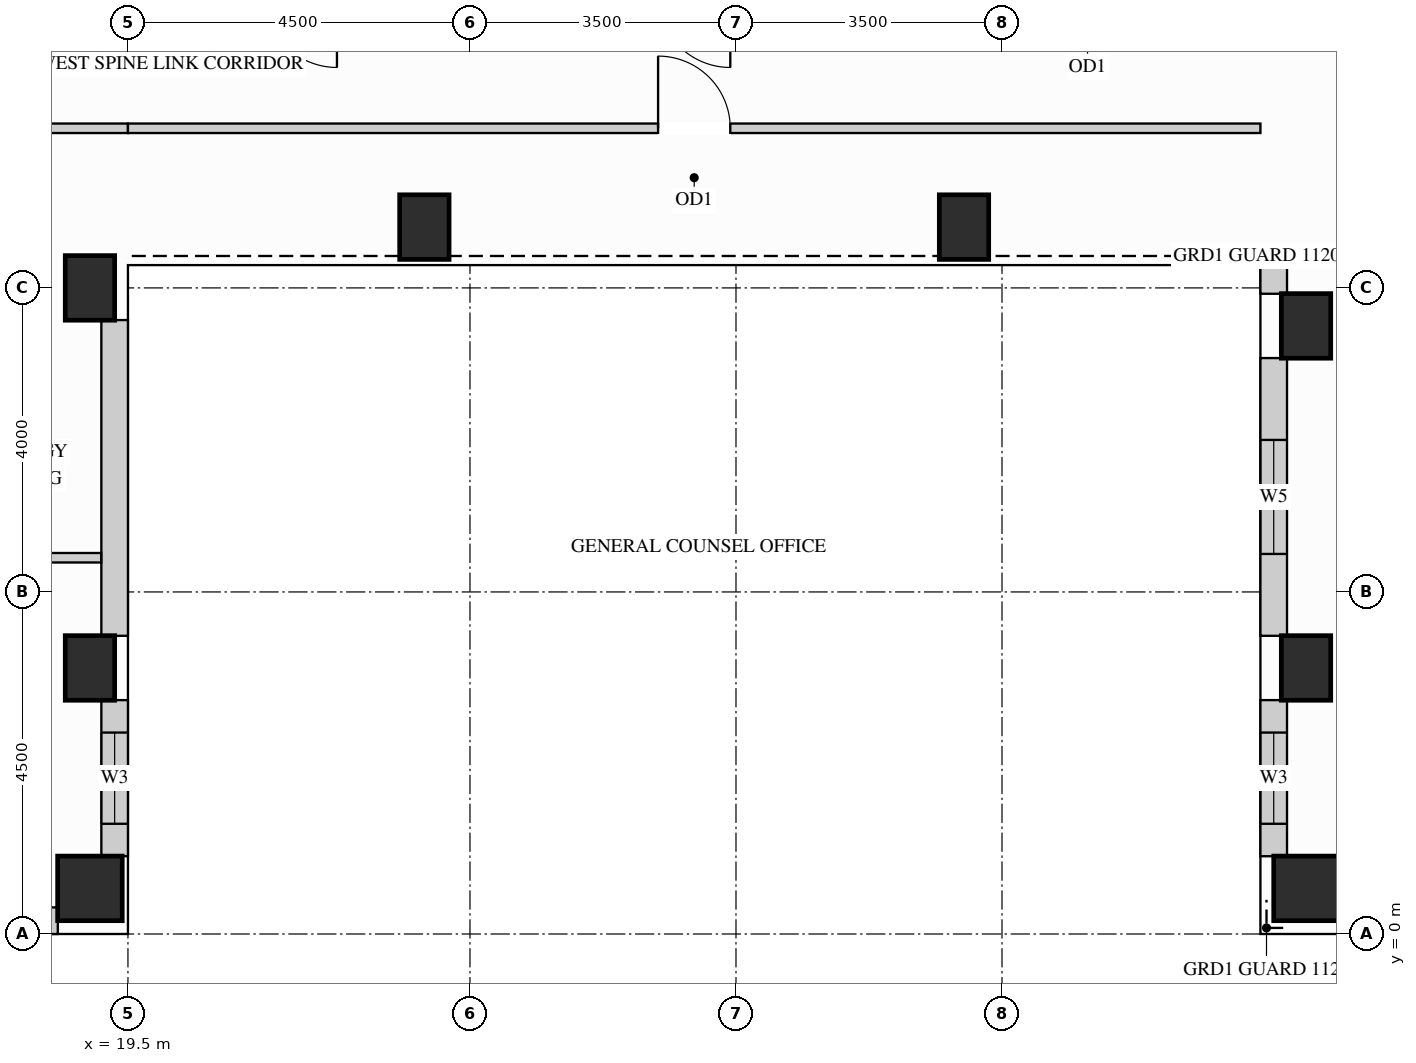
"""IFC4 building model, lengths in metres.
Left out: names, types, materials, properties, quantities, classifications, styles, units other than length and angle.
Written with IfcOpenShell. Run it as: python <this file> out.ifc"""

import sys

from ifc_helpers import new_model, si_unit, direction, frame, frame_2d, origin, origin_2d, place, context, subcontext, project, spatial, rectangle, extrude, source, transform, mapped, element, fill, save


model = new_model("IFC4")
c1 = context("Model", 3, precision=1e-05, world=origin(), true_north=direction((0.0, 1.0)))
c2 = subcontext(c1, "Body", "Model", "MODEL_VIEW")
j1 = project(units=[si_unit("LENGTHUNIT", "METRE"), si_unit("PLANEANGLEUNIT", "RADIAN")], contexts=[c1])
p1 = place(None, origin())
s1 = spatial("IfcSite", under=j1, at=p1, CompositionType="ELEMENT")
p2 = place(p1, origin())
s2 = spatial("IfcBuilding", under=s1, at=p2, CompositionType="ELEMENT")
p3 = place(p2, frame((0.0, 0.0, 244.8)))
s3 = spatial("IfcBuildingStorey", under=s2, at=p3, CompositionType="ELEMENT", Elevation=244.8)
m1 = source(origin(), c2, "Body", "SweptSolid", [
    extrude(rectangle(XDim=0.65, YDim=0.85, at=origin_2d()), origin(), (0.0, 0.0, 1.0), 3.4),
])
for number, where, z_axis, x_axis in (
    (1, (19.0, 3.5, 0.0), (0.0, 0.0, 1.0), (1.0, 0.0, 0.0)),
    (2, (19.0, 8.5, 0.0), (0.0, 0.0, 1.0), (1.0, 0.0, 0.0)),
    (3, (35.0, 3.5, 0.0), (0.0, 0.0, 1.0), (1.0, 0.0, 0.0)),
    (4, (35.0, 8.0, 0.0), (0.0, 0.0, 1.0), (1.0, 0.0, 0.0)),
    (5, (23.4, 9.3, 0.0), (0.0, 0.0, 1.0), (1.0, 0.0, 0.0)),
    (6, (30.5, 9.3, 0.0), (0.0, 0.0, 1.0), (1.0, 0.0, 0.0)),
):
    element("IfcColumn", number, at=place(p3, frame(where, z_axis=z_axis, x_axis=x_axis)), inside=s3, PredefinedType="COLUMN", context=c2, shape_type="MappedRepresentation", body=[
        mapped(m1, transform((0.0, 0.0, 0.0), x_axis=(1.0, 0.0, 0.0), y_axis=(0.0, 1.0, 0.0), z_axis=(0.0, 0.0, 1.0))),
    ])
m2 = source(origin(), c2, "Body", "SweptSolid", [
    extrude(rectangle(XDim=0.85, YDim=0.85, at=origin_2d()), origin(), (0.0, 0.0, 1.0), 3.4),
])
for number, where, z_axis, x_axis in (
    (7, (19.0, 0.6, 0.0), (0.0, 0.0, 1.0), (1.0, 0.0, 0.0)),
    (8, (35.0, 0.6, 0.0), (0.0, 0.0, 1.0), (1.0, 0.0, 0.0)),
):
    element("IfcColumn", number, at=place(p3, frame(where, z_axis=z_axis, x_axis=x_axis)), inside=s3, PredefinedType="COLUMN", context=c2, shape_type="MappedRepresentation", body=[
        mapped(m2, transform((0.0, 0.0, 0.0), x_axis=(1.0, 0.0, 0.0), y_axis=(0.0, 1.0, 0.0), z_axis=(0.0, 0.0, 1.0))),
    ])
p4 = place(p3, frame((14.923, 0.175, 0.0), z_axis=(0.0, 0.0, 1.0), x_axis=(1.0, 0.0, 0.0)))
e9 = element("IfcWall", 9, at=p4, inside=s3, PredefinedType="SOLIDWALL", context=c2, shape_type="SweptSolid", body=[
    extrude(rectangle(XDim=3.654, YDim=0.35, at=frame_2d((1.827, 0.0))), origin(), (0.0, 0.0, 1.0), 3.385),
])
p5 = place(p4, frame((0.777, 0.0, 0.78)))
e10 = element("IfcOpeningElement", 10, at=p5, cuts=e9, PredefinedType="OPENING", context=c2, shape_type="SweptSolid", body=[
    extrude(rectangle(XDim=2.1, YDim=2.25, at=frame_2d((1.05, 1.125))), frame((0.0, 0.185, 0.0), z_axis=(0.0, -1.0, 0.0), x_axis=(1.0, 0.0, 0.0)), (0.0, 0.0, 1.0), 0.37),
])
p6 = place(p3, frame((19.325, 1.023, 0.0), z_axis=(0.0, 0.0, 1.0), x_axis=(0.0, 1.0, 0.0)))
e11 = element("IfcWall", 11, at=p6, inside=s3, PredefinedType="SOLIDWALL", context=c2, shape_type="SweptSolid", body=[
    extrude(rectangle(XDim=2.054, YDim=0.35, at=frame_2d((1.027, 0.0))), origin(), (0.0, 0.0, 1.0), 2.619),
])
p7 = place(p6, frame((0.427, 0.0, 0.78)))
e12 = element("IfcOpeningElement", 12, at=p7, cuts=e11, PredefinedType="OPENING", context=c2, shape_type="SweptSolid", body=[
    extrude(rectangle(XDim=1.2, YDim=1.659, at=frame_2d((0.6, 0.83))), frame((0.0, 0.185, 0.0), z_axis=(0.0, -1.0, 0.0), x_axis=(1.0, 0.0, 0.0)), (0.0, 0.0, 1.0), 0.37),
])
m3 = source(origin(), c2, "Body", "SweptSolid", [
    extrude(rectangle(XDim=4.154, YDim=0.35, at=frame_2d((2.077, 0.0))), origin(), (0.0, 0.0, 1.0), 2.619),
])
p8 = place(p3, frame((19.325, 3.923, 0.0), z_axis=(0.0, 0.0, 1.0), x_axis=(0.0, 1.0, 0.0)))
e13 = element("IfcWall", 13, at=p8, inside=s3, PredefinedType="SOLIDWALL", context=c2, shape_type="MappedRepresentation", body=[
    mapped(m3, transform((0.0, 0.0, 0.0), x_axis=(1.0, 0.0, 0.0), y_axis=(0.0, 1.0, 0.0), z_axis=(0.0, 0.0, 1.0))),
])
m4 = source(origin(), c2, "Body", "SweptSolid", [
    extrude(rectangle(XDim=0.379, YDim=0.35, at=frame_2d((0.189, 0.0))), origin(), (0.0, 0.0, 1.0), 3.385),
])
p9 = place(p3, frame((34.575, 8.802, 0.0), z_axis=(0.0, 0.0, 1.0), x_axis=(0.0, -1.0, 0.0)))
e14 = element("IfcWall", 14, at=p9, inside=s3, PredefinedType="SOLIDWALL", context=c2, shape_type="MappedRepresentation", body=[
    mapped(m4, transform((0.0, 0.0, 0.0), x_axis=(1.0, 0.0, 0.0), y_axis=(0.0, 1.0, 0.0), z_axis=(0.0, 0.0, 1.0))),
])
p10 = place(p3, frame((34.575, 7.577, 0.0), z_axis=(0.0, 0.0, 1.0), x_axis=(0.0, -1.0, 0.0)))
e15 = element("IfcWall", 15, at=p10, inside=s3, PredefinedType="SOLIDWALL", context=c2, shape_type="SweptSolid", body=[
    extrude(rectangle(XDim=3.654, YDim=0.35, at=frame_2d((1.827, 0.0))), origin(), (0.0, 0.0, 1.0), 3.385),
])
p11 = place(p10, frame((1.077, 0.0, 0.78)))
e16 = element("IfcOpeningElement", 16, at=p11, cuts=e15, PredefinedType="OPENING", context=c2, shape_type="SweptSolid", body=[
    extrude(rectangle(XDim=1.5, YDim=2.0, at=frame_2d((0.75, 1.0))), frame((0.0, 0.185, 0.0), z_axis=(0.0, -1.0, 0.0), x_axis=(1.0, 0.0, 0.0)), (0.0, 0.0, 1.0), 0.37),
])
p12 = place(p3, frame((34.575, 3.077, 0.0), z_axis=(0.0, 0.0, 1.0), x_axis=(0.0, -1.0, 0.0)))
e17 = element("IfcWall", 17, at=p12, inside=s3, PredefinedType="SOLIDWALL", context=c2, shape_type="SweptSolid", body=[
    extrude(rectangle(XDim=2.054, YDim=0.35, at=frame_2d((1.027, 0.0))), origin(), (0.0, 0.0, 1.0), 3.385),
])
p13 = place(p12, frame((0.427, 0.0, 0.78)))
e18 = element("IfcOpeningElement", 18, at=p13, cuts=e17, PredefinedType="OPENING", context=c2, shape_type="SweptSolid", body=[
    extrude(rectangle(XDim=1.2, YDim=2.0, at=frame_2d((0.6, 1.0))), frame((0.0, 0.185, 0.0), z_axis=(0.0, -1.0, 0.0), x_axis=(1.0, 0.0, 0.0)), (0.0, 0.0, 1.0), 0.37),
])
m5 = source(origin(), c2, "Body", "SweptSolid", [
    extrude(rectangle(XDim=2.45, YDim=0.125, at=frame_2d((1.225, 0.0))), origin(), (0.0, 0.0, 1.0), 3.385),
])
p14 = place(p3, frame((17.05, 10.6, 0.0), z_axis=(0.0, 0.0, 1.0), x_axis=(1.0, 0.0, 0.0)))
e19 = element("IfcWall", 19, at=p14, inside=s3, PredefinedType="PARTITIONING", context=c2, shape_type="MappedRepresentation", body=[
    mapped(m5, transform((0.0, 0.0, 0.0), x_axis=(1.0, 0.0, 0.0), y_axis=(0.0, 1.0, 0.0), z_axis=(0.0, 0.0, 1.0))),
])
p15 = place(p3, frame((19.5, 10.6, 0.0), z_axis=(0.0, 0.0, 1.0), x_axis=(1.0, 0.0, 0.0)))
e20 = element("IfcWall", 20, at=p15, inside=s3, PredefinedType="PARTITIONING", context=c2, shape_type="SweptSolid", body=[
    extrude(rectangle(XDim=14.9, YDim=0.125, at=frame_2d((7.45, 0.0))), origin(), (0.0, 0.0, 1.0), 3.385),
])
p16 = place(p15, frame((6.975, 0.0, 0.0)))
e21 = element("IfcOpeningElement", 21, at=p16, cuts=e20, PredefinedType="OPENING", context=c2, shape_type="SweptSolid", body=[
    extrude(rectangle(XDim=0.95, YDim=2.15, at=frame_2d((0.475, 1.075))), frame((0.0, 0.073, 0.0), z_axis=(0.0, -1.0, 0.0), x_axis=(1.0, 0.0, 0.0)), (0.0, 0.0, 1.0), 0.145),
])
m6 = source(origin(), c2, "Body", "SweptSolid", [
    extrude(rectangle(XDim=2.098, YDim=0.125, at=frame_2d((1.049, 0.0))), origin(), (0.0, 0.0, 1.0), 2.848),
])
p17 = place(p3, frame((17.05, 4.95, 0.0), z_axis=(0.0, 0.0, 1.0), x_axis=(1.0, 0.0, 0.0)))
e22 = element("IfcWall", 22, at=p17, inside=s3, PredefinedType="PARTITIONING", context=c2, shape_type="MappedRepresentation", body=[
    mapped(m6, transform((0.0, 0.0, 0.0), x_axis=(1.0, 0.0, 0.0), y_axis=(0.0, 1.0, 0.0), z_axis=(0.0, 0.0, 1.0))),
])
m7 = source(origin(), c2, "Body", "SweptSolid", [
    extrude(rectangle(XDim=0.95, YDim=2.15, at=frame_2d((0.475, 1.075))), frame((0.0, 0.025, 0.0), z_axis=(0.0, -1.0, 0.0), x_axis=(1.0, 0.0, 0.0)), (0.0, 0.0, 1.0), 0.05),
])
p18 = place(p16, origin())
e23 = element("IfcDoor", 23, at=p18, inside=s3, OperationType="SINGLE_SWING_LEFT", PredefinedType="DOOR", context=c2, shape_type="MappedRepresentation", body=[
    mapped(m7, transform((0.0, 0.0, 0.0), x_axis=(1.0, 0.0, 0.0), y_axis=(0.0, 1.0, 0.0), z_axis=(0.0, 0.0, 1.0))),
])
fill(e21, e23)
m8 = source(origin(), c2, "Body", "SweptSolid", [
    extrude(rectangle(XDim=1.2, YDim=1.659, at=frame_2d((0.6, 0.83))), frame((0.0, 0.03, 0.0), z_axis=(0.0, -1.0, 0.0), x_axis=(1.0, 0.0, 0.0)), (0.0, 0.0, 1.0), 0.06),
])
p19 = place(p7, origin())
e24 = element("IfcWindow", 24, at=p19, inside=s3, PartitioningType="SINGLE_PANEL", PredefinedType="WINDOW", context=c2, shape_type="MappedRepresentation", body=[
    mapped(m8, transform((0.0, 0.0, 0.0), x_axis=(1.0, 0.0, 0.0), y_axis=(0.0, 1.0, 0.0), z_axis=(0.0, 0.0, 1.0))),
])
fill(e12, e24)
m9 = source(origin(), c2, "Body", "SweptSolid", [
    extrude(rectangle(XDim=1.2, YDim=2.0, at=frame_2d((0.6, 1.0))), frame((0.0, 0.03, 0.0), z_axis=(0.0, -1.0, 0.0), x_axis=(1.0, 0.0, 0.0)), (0.0, 0.0, 1.0), 0.06),
])
p20 = place(p13, origin())
e25 = element("IfcWindow", 25, at=p20, inside=s3, PartitioningType="SINGLE_PANEL", PredefinedType="WINDOW", context=c2, shape_type="MappedRepresentation", body=[
    mapped(m9, transform((0.0, 0.0, 0.0), x_axis=(1.0, 0.0, 0.0), y_axis=(0.0, 1.0, 0.0), z_axis=(0.0, 0.0, 1.0))),
])
fill(e18, e25)
m10 = source(origin(), c2, "Body", "SweptSolid", [
    extrude(rectangle(XDim=1.5, YDim=2.0, at=frame_2d((0.75, 1.0))), frame((0.0, 0.03, 0.0), z_axis=(0.0, -1.0, 0.0), x_axis=(1.0, 0.0, 0.0)), (0.0, 0.0, 1.0), 0.06),
])
p21 = place(p11, origin())
e26 = element("IfcWindow", 26, at=p21, inside=s3, PartitioningType="SINGLE_PANEL", PredefinedType="WINDOW", context=c2, shape_type="MappedRepresentation", body=[
    mapped(m10, transform((0.0, 0.0, 0.0), x_axis=(1.0, 0.0, 0.0), y_axis=(0.0, 1.0, 0.0), z_axis=(0.0, 0.0, 1.0))),
])
fill(e16, e26)
save(model, sys.argv[1])
